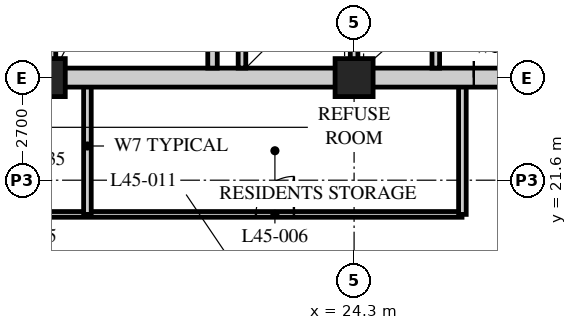
"""IFC4 building model, lengths in metres.
Left out: names, types, materials, properties, quantities, classifications, styles, units other than length and angle.
Written with IfcOpenShell. Run it as: python <this file> out.ifc"""

import sys

from ifc_helpers import new_model, si_unit, direction, frame, frame_2d, origin, origin_2d, place, context, subcontext, project, spatial, rectangle, hollow_rectangle, extrude, element, fill, save


model = new_model("IFC4")
c1 = context("Model", 3, precision=1e-05, world=origin(), true_north=direction((0.0, 1.0)))
c2 = subcontext(c1, "Body", "Model", "MODEL_VIEW")
j1 = project(units=[si_unit("LENGTHUNIT", "METRE"), si_unit("PLANEANGLEUNIT", "RADIAN")], contexts=[c1])
p1 = place(None, origin())
s1 = spatial("IfcSite", under=j1, at=p1, CompositionType="ELEMENT")
p2 = place(p1, origin())
s2 = spatial("IfcBuilding", under=s1, at=p2, CompositionType="ELEMENT")
p3 = place(p2, frame((0.0, 0.0, 177.6)))
s3 = spatial("IfcBuildingStorey", under=s2, at=p3, CompositionType="ELEMENT", Elevation=177.6)
for number, where, z_axis, x_axis in (
    (1, (16.2, 24.3, 0.0), (0.0, 0.0, 1.0), (1.0, 0.0, 0.0)),
    (2, (24.3, 24.3, 0.0), (0.0, 0.0, 1.0), (1.0, 0.0, 0.0)),
):
    element("IfcColumn", number, at=place(p3, frame(where, z_axis=z_axis, x_axis=x_axis)), inside=s3, PredefinedType="COLUMN", context=c2, shape_type="SweptSolid", body=[
        extrude(hollow_rectangle(XDim=1.0, YDim=1.0, WallThickness=0.1, at=origin_2d()), origin(), (0.0, 0.0, 1.0), 3.6),
    ])
p4 = place(p3, frame((13.95, 20.7, 0.0), z_axis=(0.0, 0.0, 1.0), x_axis=(1.0, 0.0, 0.0)))
e3 = element("IfcWall", 3, at=p4, inside=s3, PredefinedType="PARTITIONING", context=c2, shape_type="SweptSolid", body=[
    extrude(rectangle(XDim=13.19, YDim=0.15, at=frame_2d((6.595, 0.0))), origin(), (0.0, 0.0, 1.0), 3.39),
])
p5 = place(p4, frame((1.167, 0.0, 0.0)))
e4 = element("IfcOpeningElement", 4, at=p5, cuts=e3, PredefinedType="OPENING", context=c2, shape_type="SweptSolid", body=[
    extrude(rectangle(XDim=1.0, YDim=2.1, at=frame_2d((0.5, 1.05))), frame((0.0, 0.085, 0.0), z_axis=(0.0, -1.0, 0.0), x_axis=(1.0, 0.0, 0.0)), (0.0, 0.0, 1.0), 0.17),
])
p6 = place(p4, frame((7.767, 0.0, 0.0)))
e5 = element("IfcOpeningElement", 5, at=p6, cuts=e3, PredefinedType="OPENING", context=c2, shape_type="SweptSolid", body=[
    extrude(rectangle(XDim=1.0, YDim=2.1, at=frame_2d((0.5, 1.05))), frame((0.0, 0.085, 0.0), z_axis=(0.0, -1.0, 0.0), x_axis=(1.0, 0.0, 0.0)), (0.0, 0.0, 1.0), 0.17),
])
for number, where, z_axis, x_axis in (
    (6, (17.283, 20.7, 0.0), (0.0, 0.0, 1.0), (0.0, 1.0, 0.0)),
    (7, (27.15, 20.7, 0.0), (0.0, 0.0, 1.0), (0.0, 1.0, 0.0)),
):
    element("IfcWall", number, at=place(p3, frame(where, z_axis=z_axis, x_axis=x_axis)), inside=s3, PredefinedType="SOLIDWALL", context=c2, shape_type="SweptSolid", body=[
        extrude(rectangle(XDim=3.6, YDim=0.2, at=frame_2d((1.8, 0.0))), origin(), (0.0, 0.0, 1.0), 3.39),
    ])
p7 = place(p3, frame((15.95, 24.3, 0.0), z_axis=(0.0, 0.0, 1.0), x_axis=(1.0, 0.0, 0.0)))
e8 = element("IfcWall", 8, at=p7, inside=s3, PredefinedType="SOLIDWALL", context=c2, shape_type="SweptSolid", body=[
    extrude(rectangle(XDim=24.8, YDim=0.5, at=frame_2d((12.4, 0.0))), origin(), (0.0, 0.0, 1.0), 2.74),
])
p8 = place(p7, frame((11.5, 0.0, 0.0)))
e9 = element("IfcOpeningElement", 9, at=p8, cuts=e8, PredefinedType="OPENING", context=c2, shape_type="SweptSolid", body=[
    extrude(rectangle(XDim=1.8, YDim=2.4, at=frame_2d((0.9, 1.2))), frame((0.0, 0.26, 0.0), z_axis=(0.0, -1.0, 0.0), x_axis=(1.0, 0.0, 0.0)), (0.0, 0.0, 1.0), 0.52),
])
p9 = place(p3, frame((16.2, 24.55, 0.0), z_axis=(0.0, 0.0, 1.0), x_axis=(0.0, 1.0, 0.0)))
e10 = element("IfcWall", 10, at=p9, inside=s3, PredefinedType="SOLIDWALL", context=c2, shape_type="SweptSolid", body=[
    extrude(rectangle(XDim=15.7, YDim=0.5, at=frame_2d((7.85, 0.0))), origin(), (0.0, 0.0, 1.0), 2.778),
])
p10 = place(p3, frame((24.3, 24.55, 0.0), z_axis=(0.0, 0.0, 1.0), x_axis=(0.0, 1.0, 0.0)))
e11 = element("IfcWall", 11, at=p10, inside=s3, PredefinedType="SOLIDWALL", context=c2, shape_type="SweptSolid", body=[
    extrude(rectangle(XDim=7.75, YDim=0.2, at=frame_2d((3.875, 0.0))), origin(), (0.0, 0.0, 1.0), 2.778),
])
p11 = place(p10, frame((4.6, 0.0, 0.0)))
e12 = element("IfcOpeningElement", 12, at=p11, cuts=e11, PredefinedType="OPENING", context=c2, shape_type="SweptSolid", body=[
    extrude(rectangle(XDim=1.2, YDim=2.1, at=frame_2d((0.6, 1.05))), frame((0.0, 0.11, 0.0), z_axis=(0.0, -1.0, 0.0), x_axis=(1.0, 0.0, 0.0)), (0.0, 0.0, 1.0), 0.22),
])
p12 = place(p3, frame((20.575, 24.55, 0.0), z_axis=(0.0, 0.0, 1.0), x_axis=(0.0, 1.0, 0.0)))
e13 = element("IfcWall", 13, at=p12, inside=s3, PredefinedType="SOLIDWALL", context=c2, shape_type="SweptSolid", body=[
    extrude(rectangle(XDim=7.75, YDim=0.25, at=frame_2d((3.875, 0.0))), origin(), (0.0, 0.0, 1.0), 3.39),
])
p13 = place(p12, frame((6.2, 0.0, 0.0)))
e14 = element("IfcOpeningElement", 14, at=p13, cuts=e13, PredefinedType="OPENING", context=c2, shape_type="SweptSolid", body=[
    extrude(rectangle(XDim=1.2, YDim=2.1, at=frame_2d((0.6, 1.05))), frame((0.0, 0.135, 0.0), z_axis=(0.0, -1.0, 0.0), x_axis=(1.0, 0.0, 0.0)), (0.0, 0.0, 1.0), 0.27),
])
p14 = place(p3, frame((21.35, 24.55, 0.0), z_axis=(0.0, 0.0, 1.0), x_axis=(0.0, 1.0, 0.0)))
e15 = element("IfcWall", 15, at=p14, inside=s3, PredefinedType="SOLIDWALL", context=c2, shape_type="SweptSolid", body=[
    extrude(rectangle(XDim=2.6, YDim=0.2, at=frame_2d((1.3, 0.0))), origin(), (0.0, 0.0, 1.0), 3.39),
])
p15 = place(p3, frame((26.45, 24.55, 0.0), z_axis=(0.0, 0.0, 1.0), x_axis=(0.0, 1.0, 0.0)))
e16 = element("IfcWall", 16, at=p15, inside=s3, PredefinedType="SOLIDWALL", context=c2, shape_type="SweptSolid", body=[
    extrude(rectangle(XDim=1.6, YDim=0.2, at=frame_2d((0.8, 0.0))), origin(), (0.0, 0.0, 1.0), 3.39),
])
p16 = place(p6, origin())
e17 = element("IfcDoor", 17, at=p16, inside=s3, OperationType="SINGLE_SWING_RIGHT", PredefinedType="DOOR", context=c2, shape_type="SweptSolid", body=[
    extrude(rectangle(XDim=1.0, YDim=2.1, at=frame_2d((0.5, 1.05))), frame((0.0, 0.025, 0.0), z_axis=(0.0, -1.0, 0.0), x_axis=(1.0, 0.0, 0.0)), (0.0, 0.0, 1.0), 0.05),
])
fill(e5, e17)
p17 = place(p8, origin())
e18 = element("IfcDoor", 18, at=p17, inside=s3, OperationType="DOUBLE_DOOR_SINGLE_SWING", PredefinedType="DOOR", context=c2, shape_type="SweptSolid", body=[
    extrude(rectangle(XDim=1.8, YDim=2.4, at=frame_2d((0.9, 1.2))), frame((0.0, 0.025, 0.0), z_axis=(0.0, -1.0, 0.0), x_axis=(1.0, 0.0, 0.0)), (0.0, 0.0, 1.0), 0.05),
])
fill(e9, e18)
save(model, sys.argv[1])
